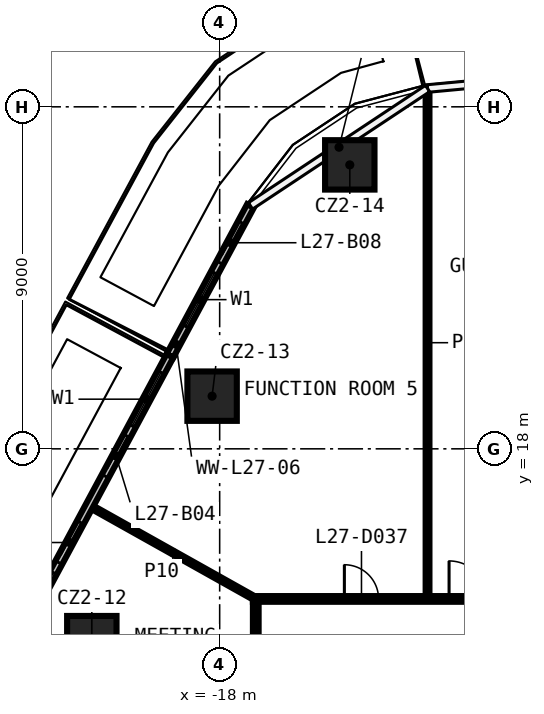
"""IFC4 building model, lengths in metres.
Left out: names, types, materials, properties, quantities, classifications, styles, units other than length and angle.
Written with IfcOpenShell. Run it as: python <this file> out.ifc"""

import sys

from ifc_helpers import new_model, si_unit, direction, frame, frame_2d, origin, origin_2d, place, context, subcontext, project, spatial, rectangle, extrude, element, fill, save


model = new_model("IFC4")
c1 = context("Model", 3, precision=1e-05, world=origin(), true_north=direction((0.0, 1.0)))
c2 = subcontext(c1, "Body", "Model", "MODEL_VIEW")
j1 = project(units=[si_unit("LENGTHUNIT", "METRE"), si_unit("PLANEANGLEUNIT", "RADIAN")], contexts=[c1])
p1 = place(None, origin())
s1 = spatial("IfcSite", under=j1, at=p1, CompositionType="ELEMENT")
p2 = place(p1, origin())
s2 = spatial("IfcBuilding", under=s1, at=p2, CompositionType="ELEMENT")
p3 = place(p2, frame((0.0, 0.0, 124.8)))
s3 = spatial("IfcBuildingStorey", under=s2, at=p3, CompositionType="ELEMENT", Elevation=124.8)
for number, where, z_axis, x_axis in (
    (1, (-21.364, 12.952, 0.0), (0.0, 0.0, 1.0), (1.0, 0.0, 0.0)),
    (2, (-18.199, 19.386, 0.0), (0.0, 0.0, 1.0), (1.0, 0.0, 0.0)),
    (3, (-14.576, 25.472, 0.0), (0.0, 0.0, 1.0), (1.0, 0.0, 0.0)),
):
    element("IfcColumn", number, at=place(p3, frame(where, z_axis=z_axis, x_axis=x_axis)), inside=s3, PredefinedType="COLUMN", context=c2, shape_type="SweptSolid", body=[
        extrude(rectangle(XDim=1.3, YDim=1.3, at=origin_2d()), origin(), (0.0, 0.0, 1.0), 3.3),
    ])
p4 = place(p3, frame((-17.125, 14.05, 0.0), z_axis=(0.0, 0.0, 1.0), x_axis=(1.0, 0.0, 0.0)))
e4 = element("IfcWall", 4, at=p4, inside=s3, PredefinedType="PARTITIONING", context=c2, shape_type="SweptSolid", body=[
    extrude(rectangle(XDim=34.25, YDim=0.15, at=frame_2d((17.125, 0.0))), origin(), (0.0, 0.0, 1.0), 3.3),
])
p5 = place(p4, frame((30.377, 0.0, 0.0)))
e5 = element("IfcOpeningElement", 5, at=p5, cuts=e4, PredefinedType="OPENING", context=c2, shape_type="SweptSolid", body=[
    extrude(rectangle(XDim=0.9, YDim=2.1, at=frame_2d((0.45, 1.05))), frame((0.0, 0.085, 0.0), z_axis=(0.0, -1.0, 0.0), x_axis=(1.0, 0.0, 0.0)), (0.0, 0.0, 1.0), 0.17),
])
p6 = place(p4, frame((23.321, 0.0, 0.0)))
e6 = element("IfcOpeningElement", 6, at=p6, cuts=e4, PredefinedType="OPENING", context=c2, shape_type="SweptSolid", body=[
    extrude(rectangle(XDim=1.0, YDim=2.1, at=frame_2d((0.5, 1.05))), frame((0.0, 0.085, 0.0), z_axis=(0.0, -1.0, 0.0), x_axis=(1.0, 0.0, 0.0)), (0.0, 0.0, 1.0), 0.17),
])
p7 = place(p4, frame((21.183, 0.0, 0.0)))
e7 = element("IfcOpeningElement", 7, at=p7, cuts=e4, PredefinedType="OPENING", context=c2, shape_type="SweptSolid", body=[
    extrude(rectangle(XDim=1.0, YDim=2.1, at=frame_2d((0.5, 1.05))), frame((0.0, 0.085, 0.0), z_axis=(0.0, -1.0, 0.0), x_axis=(1.0, 0.0, 0.0)), (0.0, 0.0, 1.0), 0.17),
])
p8 = place(p4, frame((14.241, 0.0, 0.0)))
e8 = element("IfcOpeningElement", 8, at=p8, cuts=e4, PredefinedType="OPENING", context=c2, shape_type="SweptSolid", body=[
    extrude(rectangle(XDim=1.0, YDim=2.1, at=frame_2d((0.5, 1.05))), frame((0.0, 0.085, 0.0), z_axis=(0.0, -1.0, 0.0), x_axis=(1.0, 0.0, 0.0)), (0.0, 0.0, 1.0), 0.17),
])
p9 = place(p4, frame((12.099, 0.0, 0.0)))
e9 = element("IfcOpeningElement", 9, at=p9, cuts=e4, PredefinedType="OPENING", context=c2, shape_type="SweptSolid", body=[
    extrude(rectangle(XDim=1.0, YDim=2.1, at=frame_2d((0.5, 1.05))), frame((0.0, 0.085, 0.0), z_axis=(0.0, -1.0, 0.0), x_axis=(1.0, 0.0, 0.0)), (0.0, 0.0, 1.0), 0.17),
])
p10 = place(p4, frame((5.161, 0.0, 0.0)))
e10 = element("IfcOpeningElement", 10, at=p10, cuts=e4, PredefinedType="OPENING", context=c2, shape_type="SweptSolid", body=[
    extrude(rectangle(XDim=1.0, YDim=2.1, at=frame_2d((0.5, 1.05))), frame((0.0, 0.085, 0.0), z_axis=(0.0, -1.0, 0.0), x_axis=(1.0, 0.0, 0.0)), (0.0, 0.0, 1.0), 0.17),
])
p11 = place(p4, frame((2.406, 0.0, 0.0)))
e11 = element("IfcOpeningElement", 11, at=p11, cuts=e4, PredefinedType="OPENING", context=c2, shape_type="SweptSolid", body=[
    extrude(rectangle(XDim=0.9, YDim=2.1, at=frame_2d((0.45, 1.05))), frame((0.0, 0.085, 0.0), z_axis=(0.0, -1.0, 0.0), x_axis=(1.0, 0.0, 0.0)), (0.0, 0.0, 1.0), 0.17),
])
p12 = place(p3, frame((-12.53, 14.125, 0.0), z_axis=(0.0, 0.0, 1.0), x_axis=(0.0, 1.0, 0.0)))
e12 = element("IfcWall", 12, at=p12, inside=s3, PredefinedType="PARTITIONING", context=c2, shape_type="SweptSolid", body=[
    extrude(rectangle(XDim=13.336, YDim=0.1, at=frame_2d((6.668, 0.0))), origin(), (0.0, 0.0, 1.0), 3.3),
])
p13 = place(p3, frame((-17.05, -13.975, 0.0), z_axis=(0.0, 0.0, 1.0), x_axis=(0.0, 1.0, 0.0)))
e13 = element("IfcWall", 13, at=p13, inside=s3, PredefinedType="PARTITIONING", context=c2, shape_type="SweptSolid", body=[
    extrude(rectangle(XDim=27.95, YDim=0.15, at=frame_2d((13.975, 0.0))), origin(), (0.0, 0.0, 1.0), 3.3),
])
p14 = place(p13, frame((11.186, 0.0, 0.0)))
e14 = element("IfcOpeningElement", 14, at=p14, cuts=e13, PredefinedType="OPENING", context=c2, shape_type="SweptSolid", body=[
    extrude(rectangle(XDim=0.9, YDim=2.1, at=frame_2d((0.45, 1.05))), frame((0.0, 0.085, 0.0), z_axis=(0.0, -1.0, 0.0), x_axis=(1.0, 0.0, 0.0)), (0.0, 0.0, 1.0), 0.17),
])
p15 = place(p13, frame((8.404, 0.0, 0.0)))
e15 = element("IfcOpeningElement", 15, at=p15, cuts=e13, PredefinedType="OPENING", context=c2, shape_type="SweptSolid", body=[
    extrude(rectangle(XDim=0.9, YDim=2.1, at=frame_2d((0.45, 1.05))), frame((0.0, 0.085, 0.0), z_axis=(0.0, -1.0, 0.0), x_axis=(1.0, 0.0, 0.0)), (0.0, 0.0, 1.0), 0.17),
])
p16 = place(p13, frame((1.58, 0.0, 0.0)))
e16 = element("IfcOpeningElement", 16, at=p16, cuts=e13, PredefinedType="OPENING", context=c2, shape_type="SweptSolid", body=[
    extrude(rectangle(XDim=0.9, YDim=2.1, at=frame_2d((0.45, 1.05))), frame((0.0, 0.085, 0.0), z_axis=(0.0, -1.0, 0.0), x_axis=(1.0, 0.0, 0.0)), (0.0, 0.0, 1.0), 0.17),
])
p17 = place(p13, frame((24.871, 0.0, 0.0)))
e17 = element("IfcOpeningElement", 17, at=p17, cuts=e13, PredefinedType="OPENING", context=c2, shape_type="SweptSolid", body=[
    extrude(rectangle(XDim=0.9, YDim=2.1, at=frame_2d((0.45, 1.05))), frame((0.0, 0.085, 0.0), z_axis=(0.0, -1.0, 0.0), x_axis=(1.0, 0.0, 0.0)), (0.0, 0.0, 1.0), 0.17),
])
p18 = place(p13, frame((20.159, 0.0, 0.0)))
e18 = element("IfcOpeningElement", 18, at=p18, cuts=e13, PredefinedType="OPENING", context=c2, shape_type="SweptSolid", body=[
    extrude(rectangle(XDim=0.9, YDim=2.1, at=frame_2d((0.45, 1.05))), frame((0.0, 0.085, 0.0), z_axis=(0.0, -1.0, 0.0), x_axis=(1.0, 0.0, 0.0)), (0.0, 0.0, 1.0), 0.17),
])
p19 = place(p13, frame((16.211, 0.0, 0.0)))
e19 = element("IfcOpeningElement", 19, at=p19, cuts=e13, PredefinedType="OPENING", context=c2, shape_type="SweptSolid", body=[
    extrude(rectangle(XDim=0.9, YDim=2.1, at=frame_2d((0.45, 1.05))), frame((0.0, 0.085, 0.0), z_axis=(0.0, -1.0, 0.0), x_axis=(1.0, 0.0, 0.0)), (0.0, 0.0, 1.0), 0.17),
])
p20 = place(p3, frame((-21.411, 16.494, 0.0), z_axis=(0.0, 0.0, 1.0), x_axis=(0.872342728858, -0.488894838803, 0.0)))
e20 = element("IfcWall", 20, at=p20, inside=s3, PredefinedType="PARTITIONING", context=c2, shape_type="SweptSolid", body=[
    extrude(rectangle(XDim=4.999, YDim=0.1, at=frame_2d((2.5, 0.0))), origin(), (0.0, 0.0, 1.0), 3.3),
])
p21 = place(p3, frame((-19.306, 20.451, 0.0), z_axis=(0.0, 0.0, 1.0), x_axis=(-0.473410228211, -0.880842072011, 0.0)))
e21 = element("IfcWall", 21, at=p21, inside=s3, PredefinedType="SOLIDWALL", context=c2, shape_type="SweptSolid", body=[
    extrude(rectangle(XDim=17.928, YDim=0.2, at=frame_2d((8.964, 0.0))), origin(), (0.0, 0.0, 1.0), 3.3),
])
p22 = place(p21, frame((0.5, 0.0, 0.6)))
e22 = element("IfcOpeningElement", 22, at=p22, cuts=e21, PredefinedType="OPENING", context=c2, shape_type="SweptSolid", body=[
    extrude(rectangle(XDim=1.6, YDim=2.4, at=frame_2d((0.8, 1.2))), frame((0.0, 0.11, 0.0), z_axis=(0.0, -1.0, 0.0), x_axis=(1.0, 0.0, 0.0)), (0.0, 0.0, 1.0), 0.22),
])
p23 = place(p21, frame((2.4, 0.0, 0.0)))
e23 = element("IfcOpeningElement", 23, at=p23, cuts=e21, PredefinedType="OPENING", context=c2, shape_type="SweptSolid", body=[
    extrude(rectangle(XDim=1.2, YDim=2.4, at=frame_2d((0.6, 1.2))), frame((0.0, 0.11, 0.0), z_axis=(0.0, -1.0, 0.0), x_axis=(1.0, 0.0, 0.0)), (0.0, 0.0, 1.0), 0.22),
])
p24 = place(p21, frame((6.482, 0.0, 0.6)))
e24 = element("IfcOpeningElement", 24, at=p24, cuts=e21, PredefinedType="OPENING", context=c2, shape_type="SweptSolid", body=[
    extrude(rectangle(XDim=1.6, YDim=2.4, at=frame_2d((0.8, 1.2))), frame((0.0, 0.11, 0.0), z_axis=(0.0, -1.0, 0.0), x_axis=(1.0, 0.0, 0.0)), (0.0, 0.0, 1.0), 0.22),
])
p25 = place(p21, frame((4.982, 0.0, 0.0)))
e25 = element("IfcOpeningElement", 25, at=p25, cuts=e21, PredefinedType="OPENING", context=c2, shape_type="SweptSolid", body=[
    extrude(rectangle(XDim=1.2, YDim=2.4, at=frame_2d((0.6, 1.2))), frame((0.0, 0.11, 0.0), z_axis=(0.0, -1.0, 0.0), x_axis=(1.0, 0.0, 0.0)), (0.0, 0.0, 1.0), 0.22),
])
p26 = place(p21, frame((10.964, 0.0, 0.6)))
e26 = element("IfcOpeningElement", 26, at=p26, cuts=e21, PredefinedType="OPENING", context=c2, shape_type="SweptSolid", body=[
    extrude(rectangle(XDim=1.6, YDim=2.4, at=frame_2d((0.8, 1.2))), frame((0.0, 0.11, 0.0), z_axis=(0.0, -1.0, 0.0), x_axis=(1.0, 0.0, 0.0)), (0.0, 0.0, 1.0), 0.22),
])
p27 = place(p21, frame((9.464, 0.0, 0.0)))
e27 = element("IfcOpeningElement", 27, at=p27, cuts=e21, PredefinedType="OPENING", context=c2, shape_type="SweptSolid", body=[
    extrude(rectangle(XDim=1.2, YDim=2.4, at=frame_2d((0.6, 1.2))), frame((0.0, 0.11, 0.0), z_axis=(0.0, -1.0, 0.0), x_axis=(1.0, 0.0, 0.0)), (0.0, 0.0, 1.0), 0.22),
])
p28 = place(p21, frame((13.946, 0.0, 0.6)))
e28 = element("IfcOpeningElement", 28, at=p28, cuts=e21, PredefinedType="OPENING", context=c2, shape_type="SweptSolid", body=[
    extrude(rectangle(XDim=1.6, YDim=2.4, at=frame_2d((0.8, 1.2))), frame((0.0, 0.11, 0.0), z_axis=(0.0, -1.0, 0.0), x_axis=(1.0, 0.0, 0.0)), (0.0, 0.0, 1.0), 0.22),
])
p29 = place(p21, frame((15.846, 0.0, 0.0)))
e29 = element("IfcOpeningElement", 29, at=p29, cuts=e21, PredefinedType="OPENING", context=c2, shape_type="SweptSolid", body=[
    extrude(rectangle(XDim=1.2, YDim=2.4, at=frame_2d((0.6, 1.2))), frame((0.0, 0.11, 0.0), z_axis=(0.0, -1.0, 0.0), x_axis=(1.0, 0.0, 0.0)), (0.0, 0.0, 1.0), 0.22),
])
p30 = place(p3, frame((-17.188, 24.392, 0.0), z_axis=(0.0, 0.0, 1.0), x_axis=(-0.473387015207, -0.88085454749, 0.0)))
e30 = element("IfcWall", 30, at=p30, inside=s3, PredefinedType="SOLIDWALL", context=c2, shape_type="SweptSolid", body=[
    extrude(rectangle(XDim=4.474, YDim=0.2, at=frame_2d((2.237, 0.0))), origin(), (0.0, 0.0, 1.0), 3.3),
])
p31 = place(p30, frame((2.0, 0.0, 0.6)))
e31 = element("IfcOpeningElement", 31, at=p31, cuts=e30, PredefinedType="OPENING", context=c2, shape_type="SweptSolid", body=[
    extrude(rectangle(XDim=1.6, YDim=2.4, at=frame_2d((0.8, 1.2))), frame((0.0, 0.11, 0.0), z_axis=(0.0, -1.0, 0.0), x_axis=(1.0, 0.0, 0.0)), (0.0, 0.0, 1.0), 0.22),
])
p32 = place(p30, frame((0.5, 0.0, 0.0)))
e32 = element("IfcOpeningElement", 32, at=p32, cuts=e30, PredefinedType="OPENING", context=c2, shape_type="SweptSolid", body=[
    extrude(rectangle(XDim=1.2, YDim=2.4, at=frame_2d((0.6, 1.2))), frame((0.0, 0.11, 0.0), z_axis=(0.0, -1.0, 0.0), x_axis=(1.0, 0.0, 0.0)), (0.0, 0.0, 1.0), 0.22),
])
p33 = place(p10, origin())
e33 = element("IfcDoor", 33, at=p33, inside=s3, OperationType="SINGLE_SWING_RIGHT", PredefinedType="DOOR", context=c2, shape_type="SweptSolid", body=[
    extrude(rectangle(XDim=1.0, YDim=2.1, at=frame_2d((0.5, 1.05))), frame((0.0, 0.025, 0.0), z_axis=(0.0, -1.0, 0.0), x_axis=(1.0, 0.0, 0.0)), (0.0, 0.0, 1.0), 0.05),
])
fill(e10, e33)
p34 = place(p11, origin())
e34 = element("IfcDoor", 34, at=p34, inside=s3, OperationType="SINGLE_SWING_LEFT", PredefinedType="DOOR", context=c2, shape_type="SweptSolid", body=[
    extrude(rectangle(XDim=0.9, YDim=2.1, at=frame_2d((0.45, 1.05))), frame((0.0, 0.025, 0.0), z_axis=(0.0, -1.0, 0.0), x_axis=(1.0, 0.0, 0.0)), (0.0, 0.0, 1.0), 0.05),
])
fill(e11, e34)
p35 = place(p22, origin())
e35 = element("IfcWindow", 35, at=p35, inside=s3, PartitioningType="SINGLE_PANEL", PredefinedType="WINDOW", context=c2, shape_type="SweptSolid", body=[
    extrude(rectangle(XDim=1.6, YDim=2.4, at=frame_2d((0.8, 1.2))), frame((0.0, 0.03, 0.0), z_axis=(0.0, -1.0, 0.0), x_axis=(1.0, 0.0, 0.0)), (0.0, 0.0, 1.0), 0.06),
])
fill(e22, e35)
p36 = place(p23, origin())
e36 = element("IfcDoor", 36, at=p36, inside=s3, OperationType="SLIDING_TO_LEFT", PredefinedType="DOOR", context=c2, shape_type="SweptSolid", body=[
    extrude(rectangle(XDim=1.2, YDim=2.4, at=frame_2d((0.6, 1.2))), frame((0.0, 0.025, 0.0), z_axis=(0.0, -1.0, 0.0), x_axis=(1.0, 0.0, 0.0)), (0.0, 0.0, 1.0), 0.05),
])
fill(e23, e36)
p37 = place(p24, origin())
e37 = element("IfcWindow", 37, at=p37, inside=s3, PartitioningType="SINGLE_PANEL", PredefinedType="WINDOW", context=c2, shape_type="SweptSolid", body=[
    extrude(rectangle(XDim=1.6, YDim=2.4, at=frame_2d((0.8, 1.2))), frame((0.0, 0.03, 0.0), z_axis=(0.0, -1.0, 0.0), x_axis=(1.0, 0.0, 0.0)), (0.0, 0.0, 1.0), 0.06),
])
fill(e24, e37)
p38 = place(p25, origin())
e38 = element("IfcDoor", 38, at=p38, inside=s3, OperationType="SLIDING_TO_LEFT", PredefinedType="DOOR", context=c2, shape_type="SweptSolid", body=[
    extrude(rectangle(XDim=1.2, YDim=2.4, at=frame_2d((0.6, 1.2))), frame((0.0, 0.025, 0.0), z_axis=(0.0, -1.0, 0.0), x_axis=(1.0, 0.0, 0.0)), (0.0, 0.0, 1.0), 0.05),
])
fill(e25, e38)
p39 = place(p31, origin())
e39 = element("IfcWindow", 39, at=p39, inside=s3, PartitioningType="SINGLE_PANEL", PredefinedType="WINDOW", context=c2, shape_type="SweptSolid", body=[
    extrude(rectangle(XDim=1.6, YDim=2.4, at=frame_2d((0.8, 1.2))), frame((0.0, 0.03, 0.0), z_axis=(0.0, -1.0, 0.0), x_axis=(1.0, 0.0, 0.0)), (0.0, 0.0, 1.0), 0.06),
])
fill(e31, e39)
p40 = place(p32, origin())
e40 = element("IfcDoor", 40, at=p40, inside=s3, OperationType="SLIDING_TO_LEFT", PredefinedType="DOOR", context=c2, shape_type="SweptSolid", body=[
    extrude(rectangle(XDim=1.2, YDim=2.4, at=frame_2d((0.6, 1.2))), frame((0.0, 0.025, 0.0), z_axis=(0.0, -1.0, 0.0), x_axis=(1.0, 0.0, 0.0)), (0.0, 0.0, 1.0), 0.05),
])
fill(e32, e40)
save(model, sys.argv[1])
